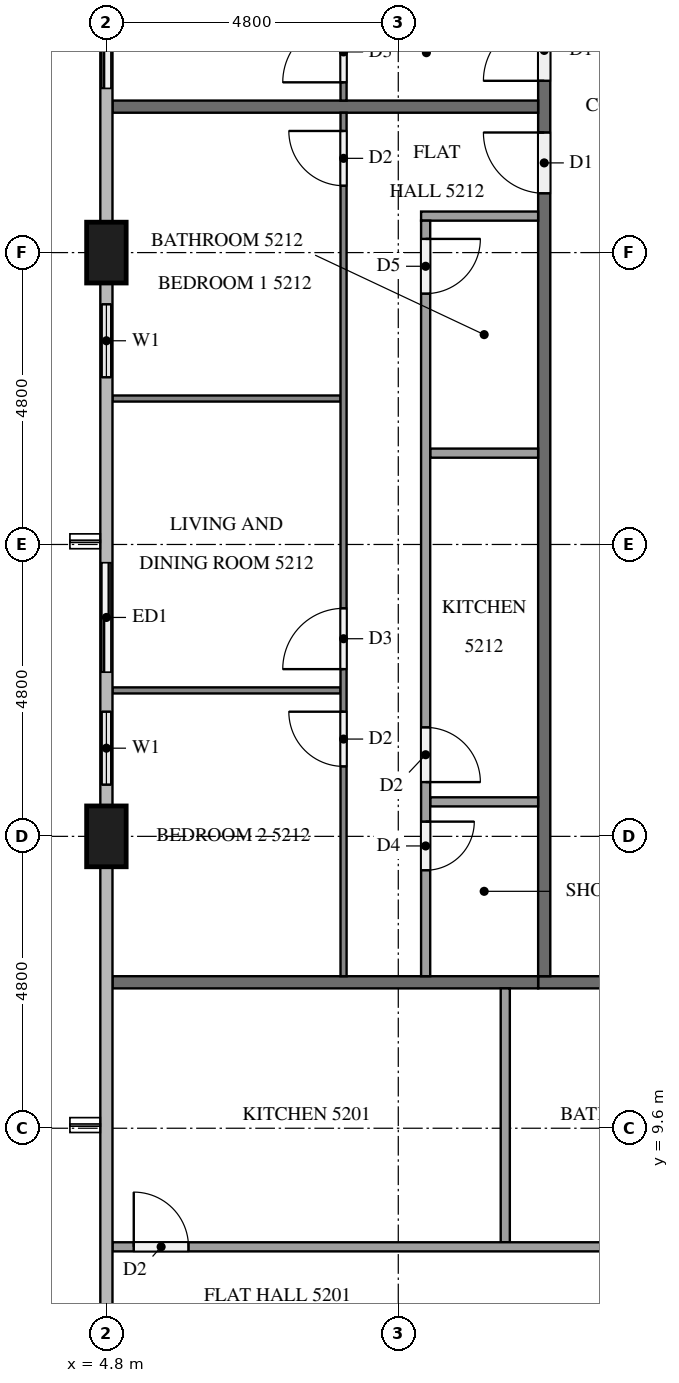
"""IFC4 building model, lengths in metres.
Left out: names, types, materials, properties, quantities, classifications, styles, units other than length and angle.
Written with IfcOpenShell. Run it as: python <this file> out.ifc"""

import sys

from ifc_helpers import new_model, si_unit, direction, frame, frame_2d, origin, origin_2d, place, context, subcontext, project, spatial, rectangle, extrude, element, fill, save


model = new_model("IFC4")
c1 = context("Model", 3, precision=1e-05, world=origin(), true_north=direction((0.0, 1.0)))
c2 = subcontext(c1, "Body", "Model", "MODEL_VIEW")
j1 = project(units=[si_unit("LENGTHUNIT", "METRE"), si_unit("PLANEANGLEUNIT", "RADIAN")], contexts=[c1])
p1 = place(None, origin())
s1 = spatial("IfcSite", under=j1, at=p1, CompositionType="ELEMENT")
p2 = place(p1, origin())
s2 = spatial("IfcBuilding", under=s1, at=p2, CompositionType="ELEMENT")
p3 = place(p2, frame((0.0, 0.0, 199.9)))
s3 = spatial("IfcBuildingStorey", under=s2, at=p3, CompositionType="ELEMENT", Elevation=199.9)
for number, where, z_axis, x_axis in (
    (1, (4.8, 24.0, 0.0), (0.0, 0.0, 1.0), (0.0, 1.0, 0.0)),
    (2, (4.8, 14.4, 0.0), (0.0, 0.0, 1.0), (0.0, 1.0, 0.0)),
):
    element("IfcColumn", number, at=place(p3, frame(where, z_axis=z_axis, x_axis=x_axis)), inside=s3, PredefinedType="COLUMN", context=c2, shape_type="SweptSolid", body=[
        extrude(rectangle(XDim=1.0, YDim=0.65, at=origin_2d()), origin(), (0.0, 0.0, 1.0), 3.1),
    ])
p4 = place(p3, frame((4.8, 28.8, 0.0), z_axis=(0.0, 0.0, 1.0), x_axis=(0.0, -1.0, 0.0)))
e3 = element("IfcWall", 3, at=p4, inside=s3, PredefinedType="SOLIDWALL", context=c2, shape_type="SweptSolid", body=[
    extrude(rectangle(XDim=2.4, YDim=0.15, at=frame_2d((1.2, 0.0))), origin(), (0.0, 0.0, 1.0), 3.1),
])
p5 = place(p4, frame((0.3, 0.0, 0.0)))
e4 = element("IfcOpeningElement", 4, at=p5, cuts=e3, PredefinedType="OPENING", context=c2, shape_type="SweptSolid", body=[
    extrude(rectangle(XDim=1.8, YDim=2.4, at=frame_2d((0.9, 1.2))), frame((0.0, 0.085, 0.0), z_axis=(0.0, -1.0, 0.0), x_axis=(1.0, 0.0, 0.0)), (0.0, 0.0, 1.0), 0.17),
])
p6 = place(p3, frame((4.8, 23.5, 0.0), z_axis=(0.0, 0.0, 1.0), x_axis=(0.0, -1.0, 0.0)))
e5 = element("IfcWall", 5, at=p6, inside=s3, PredefinedType="SOLIDWALL", context=c2, shape_type="SweptSolid", body=[
    extrude(rectangle(XDim=1.9, YDim=0.15, at=frame_2d((0.95, 0.0))), origin(), (0.0, 0.0, 1.0), 3.1),
])
p7 = place(p6, frame((0.35, 0.0, 0.9)))
e6 = element("IfcOpeningElement", 6, at=p7, cuts=e5, PredefinedType="OPENING", context=c2, shape_type="SweptSolid", body=[
    extrude(rectangle(XDim=1.2, YDim=1.4, at=frame_2d((0.6, 0.7))), frame((0.0, 0.085, 0.0), z_axis=(0.0, -1.0, 0.0), x_axis=(1.0, 0.0, 0.0)), (0.0, 0.0, 1.0), 0.17),
])
p8 = place(p3, frame((4.8, 19.2, 0.0), z_axis=(0.0, 0.0, 1.0), x_axis=(0.0, -1.0, 0.0)))
e7 = element("IfcWall", 7, at=p8, inside=s3, PredefinedType="SOLIDWALL", context=c2, shape_type="SweptSolid", body=[
    extrude(rectangle(XDim=4.3, YDim=0.15, at=frame_2d((2.15, 0.0))), origin(), (0.0, 0.0, 1.0), 3.1),
])
p9 = place(p8, frame((0.3, 0.0, 0.0)))
e8 = element("IfcOpeningElement", 8, at=p9, cuts=e7, PredefinedType="OPENING", context=c2, shape_type="SweptSolid", body=[
    extrude(rectangle(XDim=1.8, YDim=2.4, at=frame_2d((0.9, 1.2))), frame((0.0, 0.085, 0.0), z_axis=(0.0, -1.0, 0.0), x_axis=(1.0, 0.0, 0.0)), (0.0, 0.0, 1.0), 0.17),
])
p10 = place(p8, frame((2.75, 0.0, 0.9)))
e9 = element("IfcOpeningElement", 9, at=p10, cuts=e7, PredefinedType="OPENING", context=c2, shape_type="SweptSolid", body=[
    extrude(rectangle(XDim=1.2, YDim=1.4, at=frame_2d((0.6, 0.7))), frame((0.0, 0.085, 0.0), z_axis=(0.0, -1.0, 0.0), x_axis=(1.0, 0.0, 0.0)), (0.0, 0.0, 1.0), 0.17),
])
p11 = place(p3, frame((50.5, 12.0, 0.0), z_axis=(0.0, 0.0, 1.0), x_axis=(-1.0, 0.0, 0.0)))
e10 = element("IfcWall", 10, at=p11, inside=s3, PredefinedType="PARTITIONING", context=c2, shape_type="SweptSolid", body=[
    extrude(rectangle(XDim=38.6, YDim=0.2, at=frame_2d((19.3, 0.0))), origin(), (0.0, 0.0, 1.0), 3.1),
])
p12 = place(p11, frame((26.875, 0.0, 0.0)))
e11 = element("IfcOpeningElement", 11, at=p12, cuts=e10, PredefinedType="OPENING", context=c2, shape_type="SweptSolid", body=[
    extrude(rectangle(XDim=1.1, YDim=2.1, at=frame_2d((0.55, 1.05))), frame((0.0, 0.11, 0.0), z_axis=(0.0, -1.0, 0.0), x_axis=(1.0, 0.0, 0.0)), (0.0, 0.0, 1.0), 0.22),
])
p13 = place(p11, frame((25.075, 0.0, 0.0)))
e12 = element("IfcOpeningElement", 12, at=p13, cuts=e10, PredefinedType="OPENING", context=c2, shape_type="SweptSolid", body=[
    extrude(rectangle(XDim=1.0, YDim=2.1, at=frame_2d((0.5, 1.05))), frame((0.0, 0.11, 0.0), z_axis=(0.0, -1.0, 0.0), x_axis=(1.0, 0.0, 0.0)), (0.0, 0.0, 1.0), 0.22),
])
p14 = place(p11, frame((10.125, 0.0, 0.0)))
e13 = element("IfcOpeningElement", 13, at=p14, cuts=e10, PredefinedType="OPENING", context=c2, shape_type="SweptSolid", body=[
    extrude(rectangle(XDim=1.0, YDim=2.1, at=frame_2d((0.5, 1.05))), frame((0.0, 0.11, 0.0), z_axis=(0.0, -1.0, 0.0), x_axis=(1.0, 0.0, 0.0)), (0.0, 0.0, 1.0), 0.22),
])
p15 = place(p11, frame((8.275, 0.0, 0.0)))
e14 = element("IfcOpeningElement", 14, at=p15, cuts=e10, PredefinedType="OPENING", context=c2, shape_type="SweptSolid", body=[
    extrude(rectangle(XDim=1.0, YDim=2.1, at=frame_2d((0.5, 1.05))), frame((0.0, 0.11, 0.0), z_axis=(0.0, -1.0, 0.0), x_axis=(1.0, 0.0, 0.0)), (0.0, 0.0, 1.0), 0.22),
])
p16 = place(p3, frame((12.0, 12.1, 0.0), z_axis=(0.0, 0.0, 1.0), x_axis=(0.0, 1.0, 0.0)))
e15 = element("IfcWall", 15, at=p16, inside=s3, PredefinedType="PARTITIONING", context=c2, shape_type="SweptSolid", body=[
    extrude(rectangle(XDim=28.6, YDim=0.2, at=frame_2d((14.3, 0.0))), origin(), (0.0, 0.0, 1.0), 3.1),
])
p17 = place(p16, frame((21.925, 0.0, 0.0)))
e16 = element("IfcOpeningElement", 16, at=p17, cuts=e15, PredefinedType="OPENING", context=c2, shape_type="SweptSolid", body=[
    extrude(rectangle(XDim=1.0, YDim=2.1, at=frame_2d((0.5, 1.05))), frame((0.0, 0.11, 0.0), z_axis=(0.0, -1.0, 0.0), x_axis=(1.0, 0.0, 0.0)), (0.0, 0.0, 1.0), 0.22),
])
p18 = place(p16, frame((14.725, 0.0, 0.0)))
e17 = element("IfcOpeningElement", 17, at=p18, cuts=e15, PredefinedType="OPENING", context=c2, shape_type="SweptSolid", body=[
    extrude(rectangle(XDim=1.0, YDim=2.1, at=frame_2d((0.5, 1.05))), frame((0.0, 0.11, 0.0), z_axis=(0.0, -1.0, 0.0), x_axis=(1.0, 0.0, 0.0)), (0.0, 0.0, 1.0), 0.22),
])
p19 = place(p16, frame((12.875, 0.0, 0.0)))
e18 = element("IfcOpeningElement", 18, at=p19, cuts=e15, PredefinedType="OPENING", context=c2, shape_type="SweptSolid", body=[
    extrude(rectangle(XDim=1.0, YDim=2.1, at=frame_2d((0.5, 1.05))), frame((0.0, 0.11, 0.0), z_axis=(0.0, -1.0, 0.0), x_axis=(1.0, 0.0, 0.0)), (0.0, 0.0, 1.0), 0.22),
])
for number, where, z_axis, x_axis in (
    (19, (4.9, 12.0, 0.0), (0.0, 0.0, 1.0), (1.0, 0.0, 0.0)),
    (20, (4.9, 26.4, 0.0), (0.0, 0.0, 1.0), (1.0, 0.0, 0.0)),
):
    element("IfcWall", number, at=place(p3, frame(where, z_axis=z_axis, x_axis=x_axis)), inside=s3, PredefinedType="PARTITIONING", context=c2, shape_type="SweptSolid", body=[
        extrude(rectangle(XDim=7.0, YDim=0.2, at=frame_2d((3.5, 0.0))), origin(), (0.0, 0.0, 1.0), 3.1),
    ])
p20 = place(p3, frame((11.359, 11.9, 0.0), z_axis=(0.0, 0.0, 1.0), x_axis=(0.0, -1.0, 0.0)))
e21 = element("IfcWall", 21, at=p20, inside=s3, PredefinedType="PARTITIONING", context=c2, shape_type="SweptSolid", body=[
    extrude(rectangle(XDim=4.175, YDim=0.15, at=frame_2d((2.087, 0.0))), origin(), (0.0, 0.0, 1.0), 3.1),
])
p21 = place(p3, frame((4.9, 7.65, 0.0), z_axis=(0.0, 0.0, 1.0), x_axis=(1.0, 0.0, 0.0)))
e22 = element("IfcWall", 22, at=p21, inside=s3, PredefinedType="PARTITIONING", context=c2, shape_type="SweptSolid", body=[
    extrude(rectangle(XDim=17.225, YDim=0.15, at=frame_2d((8.613, 0.0))), origin(), (0.0, 0.0, 1.0), 3.1),
])
p22 = place(p21, frame((16.125, 0.0, 0.0)))
e23 = element("IfcOpeningElement", 23, at=p22, cuts=e22, PredefinedType="OPENING", context=c2, shape_type="SweptSolid", body=[
    extrude(rectangle(XDim=0.8, YDim=2.1, at=frame_2d((0.4, 1.05))), frame((0.0, 0.085, 0.0), z_axis=(0.0, -1.0, 0.0), x_axis=(1.0, 0.0, 0.0)), (0.0, 0.0, 1.0), 0.17),
])
p23 = place(p21, frame((11.091, 0.0, 0.0)))
e24 = element("IfcOpeningElement", 24, at=p23, cuts=e22, PredefinedType="OPENING", context=c2, shape_type="SweptSolid", body=[
    extrude(rectangle(XDim=0.8, YDim=2.1, at=frame_2d((0.4, 1.05))), frame((0.0, 0.085, 0.0), z_axis=(0.0, -1.0, 0.0), x_axis=(1.0, 0.0, 0.0)), (0.0, 0.0, 1.0), 0.17),
])
p24 = place(p21, frame((9.541, 0.0, 0.0)))
e25 = element("IfcOpeningElement", 25, at=p24, cuts=e22, PredefinedType="OPENING", context=c2, shape_type="SweptSolid", body=[
    extrude(rectangle(XDim=0.9, YDim=2.1, at=frame_2d((0.45, 1.05))), frame((0.0, 0.085, 0.0), z_axis=(0.0, -1.0, 0.0), x_axis=(1.0, 0.0, 0.0)), (0.0, 0.0, 1.0), 0.17),
])
p25 = place(p21, frame((0.35, 0.0, 0.0)))
e26 = element("IfcOpeningElement", 26, at=p25, cuts=e22, PredefinedType="OPENING", context=c2, shape_type="SweptSolid", body=[
    extrude(rectangle(XDim=0.9, YDim=2.1, at=frame_2d((0.45, 1.05))), frame((0.0, 0.085, 0.0), z_axis=(0.0, -1.0, 0.0), x_axis=(1.0, 0.0, 0.0)), (0.0, 0.0, 1.0), 0.17),
])
p26 = place(p3, frame((8.7, 26.5, 0.0), z_axis=(0.0, 0.0, 1.0), x_axis=(0.0, 1.0, 0.0)))
e27 = element("IfcWall", 27, at=p26, inside=s3, PredefinedType="PARTITIONING", context=c2, shape_type="SweptSolid", body=[
    extrude(rectangle(XDim=7.0, YDim=0.1, at=frame_2d((3.5, 0.0))), origin(), (0.0, 0.0, 1.0), 3.1),
])
p27 = place(p26, frame((0.3, 0.0, 0.0)))
e28 = element("IfcOpeningElement", 28, at=p27, cuts=e27, PredefinedType="OPENING", context=c2, shape_type="SweptSolid", body=[
    extrude(rectangle(XDim=1.0, YDim=2.1, at=frame_2d((0.5, 1.05))), frame((0.0, 0.06, 0.0), z_axis=(0.0, -1.0, 0.0), x_axis=(1.0, 0.0, 0.0)), (0.0, 0.0, 1.0), 0.12),
])
for number, where, z_axis, x_axis in (
    (29, (8.65, 21.6, 0.0), (0.0, 0.0, 1.0), (-1.0, 0.0, 0.0)),
    (30, (8.65, 16.8, 0.0), (0.0, 0.0, 1.0), (-1.0, 0.0, 0.0)),
):
    element("IfcWall", number, at=place(p3, frame(where, z_axis=z_axis, x_axis=x_axis)), inside=s3, PredefinedType="PARTITIONING", context=c2, shape_type="SweptSolid", body=[
        extrude(rectangle(XDim=3.75, YDim=0.1, at=frame_2d((1.875, 0.0))), origin(), (0.0, 0.0, 1.0), 3.1),
    ])
p28 = place(p3, frame((8.7, 12.1, 0.0), z_axis=(0.0, 0.0, 1.0), x_axis=(0.0, 1.0, 0.0)))
e31 = element("IfcWall", 31, at=p28, inside=s3, PredefinedType="PARTITIONING", context=c2, shape_type="SweptSolid", body=[
    extrude(rectangle(XDim=14.2, YDim=0.1, at=frame_2d((7.1, 0.0))), origin(), (0.0, 0.0, 1.0), 3.1),
])
p29 = place(p28, frame((13.0, 0.0, 0.0)))
e32 = element("IfcOpeningElement", 32, at=p29, cuts=e31, PredefinedType="OPENING", context=c2, shape_type="SweptSolid", body=[
    extrude(rectangle(XDim=0.9, YDim=2.1, at=frame_2d((0.45, 1.05))), frame((0.0, 0.06, 0.0), z_axis=(0.0, -1.0, 0.0), x_axis=(1.0, 0.0, 0.0)), (0.0, 0.0, 1.0), 0.12),
])
p30 = place(p28, frame((5.05, 0.0, 0.0)))
e33 = element("IfcOpeningElement", 33, at=p30, cuts=e31, PredefinedType="OPENING", context=c2, shape_type="SweptSolid", body=[
    extrude(rectangle(XDim=1.0, YDim=2.1, at=frame_2d((0.5, 1.05))), frame((0.0, 0.06, 0.0), z_axis=(0.0, -1.0, 0.0), x_axis=(1.0, 0.0, 0.0)), (0.0, 0.0, 1.0), 0.12),
])
p31 = place(p28, frame((3.45, 0.0, 0.0)))
e34 = element("IfcOpeningElement", 34, at=p31, cuts=e31, PredefinedType="OPENING", context=c2, shape_type="SweptSolid", body=[
    extrude(rectangle(XDim=0.9, YDim=2.1, at=frame_2d((0.45, 1.05))), frame((0.0, 0.06, 0.0), z_axis=(0.0, -1.0, 0.0), x_axis=(1.0, 0.0, 0.0)), (0.0, 0.0, 1.0), 0.12),
])
for number, where, z_axis, x_axis in (
    (35, (11.9, 20.702, 0.0), (0.0, 0.0, 1.0), (-1.0, 0.0, 0.0)),
    (36, (11.9, 14.967, 0.0), (0.0, 0.0, 1.0), (-1.0, 0.0, 0.0)),
):
    element("IfcWall", number, at=place(p3, frame(where, z_axis=z_axis, x_axis=x_axis)), inside=s3, PredefinedType="PARTITIONING", context=c2, shape_type="SweptSolid", body=[
        extrude(rectangle(XDim=1.775, YDim=0.15, at=frame_2d((0.887, 0.0))), origin(), (0.0, 0.0, 1.0), 3.1),
    ])
p32 = place(p3, frame((11.9, 24.6, 0.0), z_axis=(0.0, 0.0, 1.0), x_axis=(-1.0, 0.0, 0.0)))
e37 = element("IfcWall", 37, at=p32, inside=s3, PredefinedType="PARTITIONING", context=c2, shape_type="SweptSolid", body=[
    extrude(rectangle(XDim=1.925, YDim=0.15, at=frame_2d((0.962, 0.0))), origin(), (0.0, 0.0, 1.0), 3.1),
])
p33 = place(p3, frame((10.05, 24.525, 0.0), z_axis=(0.0, 0.0, 1.0), x_axis=(0.0, -1.0, 0.0)))
e38 = element("IfcWall", 38, at=p33, inside=s3, PredefinedType="PARTITIONING", context=c2, shape_type="SweptSolid", body=[
    extrude(rectangle(XDim=12.425, YDim=0.15, at=frame_2d((6.212, 0.0))), origin(), (0.0, 0.0, 1.0), 3.1),
])
p34 = place(p33, frame((0.3, 0.0, 0.0)))
e39 = element("IfcOpeningElement", 39, at=p34, cuts=e38, PredefinedType="OPENING", context=c2, shape_type="SweptSolid", body=[
    extrude(rectangle(XDim=0.9, YDim=2.1, at=frame_2d((0.45, 1.05))), frame((0.0, 0.085, 0.0), z_axis=(0.0, -1.0, 0.0), x_axis=(1.0, 0.0, 0.0)), (0.0, 0.0, 1.0), 0.17),
])
p35 = place(p33, frame((8.333, 0.0, 0.0)))
e40 = element("IfcOpeningElement", 40, at=p35, cuts=e38, PredefinedType="OPENING", context=c2, shape_type="SweptSolid", body=[
    extrude(rectangle(XDim=0.9, YDim=2.1, at=frame_2d((0.45, 1.05))), frame((0.0, 0.085, 0.0), z_axis=(0.0, -1.0, 0.0), x_axis=(1.0, 0.0, 0.0)), (0.0, 0.0, 1.0), 0.17),
])
p36 = place(p33, frame((9.883, 0.0, 0.0)))
e41 = element("IfcOpeningElement", 41, at=p36, cuts=e38, PredefinedType="OPENING", context=c2, shape_type="SweptSolid", body=[
    extrude(rectangle(XDim=0.8, YDim=2.1, at=frame_2d((0.4, 1.05))), frame((0.0, 0.085, 0.0), z_axis=(0.0, -1.0, 0.0), x_axis=(1.0, 0.0, 0.0)), (0.0, 0.0, 1.0), 0.17),
])
p37 = place(p5, origin())
e42 = element("IfcDoor", 42, at=p37, inside=s3, OperationType="SLIDING_TO_LEFT", PredefinedType="DOOR", context=c2, shape_type="SweptSolid", body=[
    extrude(rectangle(XDim=1.8, YDim=2.4, at=frame_2d((0.9, 1.2))), frame((0.0, 0.025, 0.0), z_axis=(0.0, -1.0, 0.0), x_axis=(1.0, 0.0, 0.0)), (0.0, 0.0, 1.0), 0.05),
])
fill(e4, e42)
p38 = place(p7, origin())
e43 = element("IfcWindow", 43, at=p38, inside=s3, PartitioningType="SINGLE_PANEL", PredefinedType="WINDOW", context=c2, shape_type="SweptSolid", body=[
    extrude(rectangle(XDim=1.2, YDim=1.4, at=frame_2d((0.6, 0.7))), frame((0.0, 0.03, 0.0), z_axis=(0.0, -1.0, 0.0), x_axis=(1.0, 0.0, 0.0)), (0.0, 0.0, 1.0), 0.06),
])
fill(e6, e43)
p39 = place(p9, origin())
e44 = element("IfcDoor", 44, at=p39, inside=s3, OperationType="SLIDING_TO_RIGHT", PredefinedType="DOOR", context=c2, shape_type="SweptSolid", body=[
    extrude(rectangle(XDim=1.8, YDim=2.4, at=frame_2d((0.9, 1.2))), frame((0.0, 0.025, 0.0), z_axis=(0.0, -1.0, 0.0), x_axis=(1.0, 0.0, 0.0)), (0.0, 0.0, 1.0), 0.05),
])
fill(e8, e44)
p40 = place(p10, origin())
e45 = element("IfcWindow", 45, at=p40, inside=s3, PartitioningType="SINGLE_PANEL", PredefinedType="WINDOW", context=c2, shape_type="SweptSolid", body=[
    extrude(rectangle(XDim=1.2, YDim=1.4, at=frame_2d((0.6, 0.7))), frame((0.0, 0.03, 0.0), z_axis=(0.0, -1.0, 0.0), x_axis=(1.0, 0.0, 0.0)), (0.0, 0.0, 1.0), 0.06),
])
fill(e9, e45)
p41 = place(p18, origin())
e46 = element("IfcDoor", 46, at=p41, inside=s3, OperationType="SINGLE_SWING_LEFT", PredefinedType="DOOR", context=c2, shape_type="SweptSolid", body=[
    extrude(rectangle(XDim=1.0, YDim=2.1, at=frame_2d((0.5, 1.05))), frame((0.0, 0.025, 0.0), z_axis=(0.0, -1.0, 0.0), x_axis=(1.0, 0.0, 0.0)), (0.0, 0.0, 1.0), 0.05),
])
fill(e17, e46)
p42 = place(p19, origin())
e47 = element("IfcDoor", 47, at=p42, inside=s3, OperationType="SINGLE_SWING_RIGHT", PredefinedType="DOOR", context=c2, shape_type="SweptSolid", body=[
    extrude(rectangle(XDim=1.0, YDim=2.1, at=frame_2d((0.5, 1.05))), frame((0.0, 0.025, 0.0), z_axis=(0.0, -1.0, 0.0), x_axis=(1.0, 0.0, 0.0)), (0.0, 0.0, 1.0), 0.05),
])
fill(e18, e47)
p43 = place(p25, origin())
e48 = element("IfcDoor", 48, at=p43, inside=s3, OperationType="SINGLE_SWING_LEFT", PredefinedType="DOOR", context=c2, shape_type="SweptSolid", body=[
    extrude(rectangle(XDim=0.9, YDim=2.1, at=frame_2d((0.45, 1.05))), frame((0.0, 0.025, 0.0), z_axis=(0.0, -1.0, 0.0), x_axis=(1.0, 0.0, 0.0)), (0.0, 0.0, 1.0), 0.05),
])
fill(e26, e48)
p44 = place(p27, origin())
e49 = element("IfcDoor", 49, at=p44, inside=s3, OperationType="SINGLE_SWING_LEFT", PredefinedType="DOOR", context=c2, shape_type="SweptSolid", body=[
    extrude(rectangle(XDim=1.0, YDim=2.1, at=frame_2d((0.5, 1.05))), frame((0.0, 0.025, 0.0), z_axis=(0.0, -1.0, 0.0), x_axis=(1.0, 0.0, 0.0)), (0.0, 0.0, 1.0), 0.05),
])
fill(e28, e49)
p45 = place(p29, origin())
e50 = element("IfcDoor", 50, at=p45, inside=s3, OperationType="SINGLE_SWING_RIGHT", PredefinedType="DOOR", context=c2, shape_type="SweptSolid", body=[
    extrude(rectangle(XDim=0.9, YDim=2.1, at=frame_2d((0.45, 1.05))), frame((0.0, 0.025, 0.0), z_axis=(0.0, -1.0, 0.0), x_axis=(1.0, 0.0, 0.0)), (0.0, 0.0, 1.0), 0.05),
])
fill(e32, e50)
p46 = place(p30, origin())
e51 = element("IfcDoor", 51, at=p46, inside=s3, OperationType="SINGLE_SWING_LEFT", PredefinedType="DOOR", context=c2, shape_type="SweptSolid", body=[
    extrude(rectangle(XDim=1.0, YDim=2.1, at=frame_2d((0.5, 1.05))), frame((0.0, 0.025, 0.0), z_axis=(0.0, -1.0, 0.0), x_axis=(1.0, 0.0, 0.0)), (0.0, 0.0, 1.0), 0.05),
])
fill(e33, e51)
p47 = place(p31, origin())
e52 = element("IfcDoor", 52, at=p47, inside=s3, OperationType="SINGLE_SWING_RIGHT", PredefinedType="DOOR", context=c2, shape_type="SweptSolid", body=[
    extrude(rectangle(XDim=0.9, YDim=2.1, at=frame_2d((0.45, 1.05))), frame((0.0, 0.025, 0.0), z_axis=(0.0, -1.0, 0.0), x_axis=(1.0, 0.0, 0.0)), (0.0, 0.0, 1.0), 0.05),
])
fill(e34, e52)
p48 = place(p34, origin())
e53 = element("IfcDoor", 53, at=p48, inside=s3, OperationType="SINGLE_SWING_LEFT", PredefinedType="DOOR", context=c2, shape_type="SweptSolid", body=[
    extrude(rectangle(XDim=0.9, YDim=2.1, at=frame_2d((0.45, 1.05))), frame((0.0, 0.025, 0.0), z_axis=(0.0, -1.0, 0.0), x_axis=(1.0, 0.0, 0.0)), (0.0, 0.0, 1.0), 0.05),
])
fill(e39, e53)
p49 = place(p35, origin())
e54 = element("IfcDoor", 54, at=p49, inside=s3, OperationType="SINGLE_SWING_RIGHT", PredefinedType="DOOR", context=c2, shape_type="SweptSolid", body=[
    extrude(rectangle(XDim=0.9, YDim=2.1, at=frame_2d((0.45, 1.05))), frame((0.0, 0.025, 0.0), z_axis=(0.0, -1.0, 0.0), x_axis=(1.0, 0.0, 0.0)), (0.0, 0.0, 1.0), 0.05),
])
fill(e40, e54)
p50 = place(p36, origin())
e55 = element("IfcDoor", 55, at=p50, inside=s3, OperationType="SINGLE_SWING_LEFT", PredefinedType="DOOR", context=c2, shape_type="SweptSolid", body=[
    extrude(rectangle(XDim=0.8, YDim=2.1, at=frame_2d((0.4, 1.05))), frame((0.0, 0.025, 0.0), z_axis=(0.0, -1.0, 0.0), x_axis=(1.0, 0.0, 0.0)), (0.0, 0.0, 1.0), 0.05),
])
fill(e41, e55)
save(model, sys.argv[1])
